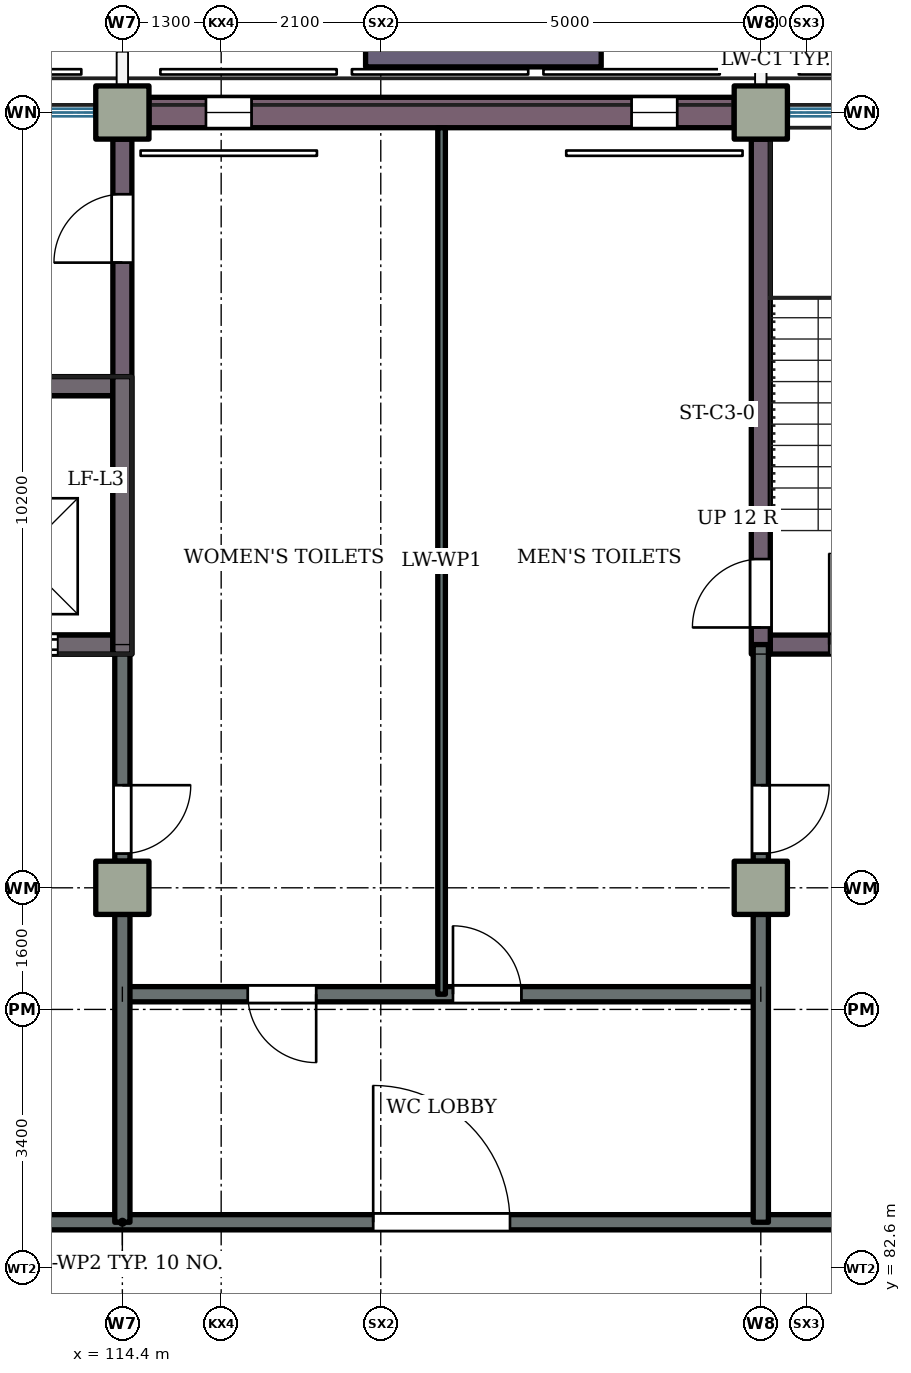
"""IFC4 building model, lengths in metres.
Left out: names, types, materials, properties, quantities, classifications, styles, units other than length and angle.
Written with IfcOpenShell. Run it as: python <this file> out.ifc"""

import sys

from ifc_helpers import new_model, si_unit, direction, frame, frame_2d, origin, origin_2d, place, context, subcontext, project, spatial, rectangle, extrude, element, fill, save


model = new_model("IFC4")
c1 = context("Model", 3, precision=1e-05, world=origin(), true_north=direction((0.0, 1.0)))
c2 = subcontext(c1, "Body", "Model", "MODEL_VIEW")
j1 = project(units=[si_unit("LENGTHUNIT", "METRE"), si_unit("PLANEANGLEUNIT", "RADIAN")], contexts=[c1])
p1 = place(None, origin())
s1 = spatial("IfcSite", under=j1, at=p1, CompositionType="ELEMENT")
p2 = place(p1, origin())
s2 = spatial("IfcBuilding", under=s1, at=p2, CompositionType="ELEMENT")
p3 = place(p2, origin())
s3 = spatial("IfcBuildingStorey", under=s2, at=p3, CompositionType="ELEMENT", Elevation=0.0)
for number, where, z_axis, x_axis in (
    (1, (114.4, 87.6, 0.0), (0.0, 0.0, 1.0), (1.0, 0.0, 0.0)),
    (2, (122.8, 87.6, 0.0), (0.0, 0.0, 1.0), (1.0, 0.0, 0.0)),
    (3, (114.4, 97.8, 0.0), (0.0, 0.0, 1.0), (1.0, 0.0, 0.0)),
    (4, (122.8, 97.8, 0.0), (0.0, 0.0, 1.0), (1.0, 0.0, 0.0)),
):
    element("IfcColumn", number, at=place(p3, frame(where, z_axis=z_axis, x_axis=x_axis)), inside=s3, PredefinedType="COLUMN", context=c2, shape_type="SweptSolid", body=[
        extrude(rectangle(XDim=0.7, YDim=0.7, at=origin_2d()), origin(), (0.0, 0.0, 1.0), 4.2),
    ])
p4 = place(p3, frame((111.825, 90.8, 0.0), z_axis=(0.0, 0.0, 1.0), x_axis=(1.0, 0.0, 0.0)))
e5 = element("IfcWall", 5, at=p4, inside=s3, PredefinedType="SHEAR", context=c2, shape_type="SweptSolid", body=[
    extrude(rectangle(XDim=2.45, YDim=0.25, at=frame_2d((1.225, 0.0))), origin(), (0.0, 0.0, 1.0), 4.2),
])
p5 = place(p4, frame((0.725, 0.0, 0.0)))
e6 = element("IfcOpeningElement", 6, at=p5, cuts=e5, PredefinedType="OPENING", context=c2, shape_type="SweptSolid", body=[
    extrude(rectangle(XDim=1.0, YDim=2.1, at=frame_2d((0.5, 1.05))), frame((0.0, 0.135, 0.0), z_axis=(0.0, -1.0, 0.0), x_axis=(1.0, 0.0, 0.0)), (0.0, 0.0, 1.0), 0.27),
])
p6 = place(p3, frame((122.925, 90.8, 0.0), z_axis=(0.0, 0.0, 1.0), x_axis=(1.0, 0.0, 0.0)))
e7 = element("IfcWall", 7, at=p6, inside=s3, PredefinedType="SHEAR", context=c2, shape_type="SweptSolid", body=[
    extrude(rectangle(XDim=5.45, YDim=0.25, at=frame_2d((2.725, 0.0))), origin(), (0.0, 0.0, 1.0), 4.2),
])
p7 = place(p6, frame((0.775, 0.0, 0.0)))
e8 = element("IfcOpeningElement", 8, at=p7, cuts=e7, PredefinedType="OPENING", context=c2, shape_type="SweptSolid", body=[
    extrude(rectangle(XDim=1.2, YDim=2.1, at=frame_2d((0.6, 1.05))), frame((0.0, 0.135, 0.0), z_axis=(0.0, -1.0, 0.0), x_axis=(1.0, 0.0, 0.0)), (0.0, 0.0, 1.0), 0.27),
])
p8 = place(p3, frame((111.825, 94.2, 0.0), z_axis=(0.0, 0.0, 1.0), x_axis=(1.0, 0.0, 0.0)))
e9 = element("IfcWall", 9, at=p8, inside=s3, PredefinedType="SHEAR", context=c2, shape_type="SweptSolid", body=[
    extrude(rectangle(XDim=2.45, YDim=0.25, at=frame_2d((1.225, 0.0))), origin(), (0.0, 0.0, 1.0), 4.2),
])
p9 = place(p3, frame((114.4, 90.675, 0.0), z_axis=(0.0, 0.0, 1.0), x_axis=(0.0, 1.0, 0.0)))
e10 = element("IfcWall", 10, at=p9, inside=s3, PredefinedType="SHEAR", context=c2, shape_type="SweptSolid", body=[
    extrude(rectangle(XDim=6.775, YDim=0.25, at=frame_2d((3.387, 0.0))), origin(), (0.0, 0.0, 1.0), 4.2),
])
p10 = place(p9, frame((5.15, 0.0, 0.0)))
e11 = element("IfcOpeningElement", 11, at=p10, cuts=e10, PredefinedType="OPENING", context=c2, shape_type="SweptSolid", body=[
    extrude(rectangle(XDim=0.9, YDim=2.1, at=frame_2d((0.45, 1.05))), frame((0.0, 0.135, 0.0), z_axis=(0.0, -1.0, 0.0), x_axis=(1.0, 0.0, 0.0)), (0.0, 0.0, 1.0), 0.27),
])
p11 = place(p3, frame((122.8, 90.675, 0.0), z_axis=(0.0, 0.0, 1.0), x_axis=(0.0, 1.0, 0.0)))
e12 = element("IfcWall", 12, at=p11, inside=s3, PredefinedType="SHEAR", context=c2, shape_type="SweptSolid", body=[
    extrude(rectangle(XDim=6.775, YDim=0.25, at=frame_2d((3.387, 0.0))), origin(), (0.0, 0.0, 1.0), 4.2),
])
p12 = place(p11, frame((0.35, 0.0, 0.0)))
e13 = element("IfcOpeningElement", 13, at=p12, cuts=e12, PredefinedType="OPENING", context=c2, shape_type="SweptSolid", body=[
    extrude(rectangle(XDim=0.9, YDim=2.1, at=frame_2d((0.45, 1.05))), frame((0.0, 0.135, 0.0), z_axis=(0.0, -1.0, 0.0), x_axis=(1.0, 0.0, 0.0)), (0.0, 0.0, 1.0), 0.27),
])
p13 = place(p3, frame((114.75, 97.8, 0.0), z_axis=(0.0, 0.0, 1.0), x_axis=(1.0, 0.0, 0.0)))
e14 = element("IfcWall", 14, at=p13, inside=s3, PredefinedType="SOLIDWALL", context=c2, shape_type="SweptSolid", body=[
    extrude(rectangle(XDim=7.7, YDim=0.4, at=frame_2d((3.85, 0.0))), origin(), (0.0, 0.0, 1.0), 3.32),
])
p14 = place(p13, frame((0.75, 0.0, 2.1)))
e15 = element("IfcOpeningElement", 15, at=p14, cuts=e14, PredefinedType="OPENING", context=c2, shape_type="SweptSolid", body=[
    extrude(rectangle(XDim=0.6, YDim=0.9, at=frame_2d((0.3, 0.45))), frame((0.0, 0.21, 0.0), z_axis=(0.0, -1.0, 0.0), x_axis=(1.0, 0.0, 0.0)), (0.0, 0.0, 1.0), 0.42),
])
p15 = place(p13, frame((6.35, 0.0, 2.1)))
e16 = element("IfcOpeningElement", 16, at=p15, cuts=e14, PredefinedType="OPENING", context=c2, shape_type="SweptSolid", body=[
    extrude(rectangle(XDim=0.6, YDim=0.9, at=frame_2d((0.3, 0.45))), frame((0.0, 0.21, 0.0), z_axis=(0.0, -1.0, 0.0), x_axis=(1.0, 0.0, 0.0)), (0.0, 0.0, 1.0), 0.42),
])
p16 = place(p3, frame((120.7, 98.9, 0.0), z_axis=(0.0, 0.0, 1.0), x_axis=(-1.0, 0.0, 0.0)))
e17 = element("IfcWall", 17, at=p16, inside=s3, PredefinedType="STANDARD", context=c2, shape_type="SweptSolid", body=[
    extrude(rectangle(XDim=3.1, YDim=1.0, at=frame_2d((1.55, 0.0))), origin(), (0.0, 0.0, 1.0), 4.2),
])
p17 = place(p3, frame((97.6, 83.2, 0.0), z_axis=(0.0, 0.0, 1.0), x_axis=(1.0, 0.0, 0.0)))
e18 = element("IfcWall", 18, at=p17, inside=s3, PredefinedType="PARTITIONING", context=c2, shape_type="SweptSolid", body=[
    extrude(rectangle(XDim=33.6, YDim=0.2, at=frame_2d((16.8, 0.0))), origin(), (0.0, 0.0, 1.0), 3.92),
])
p18 = place(p17, frame((3.3, 0.0, 0.0)))
e19 = element("IfcOpeningElement", 19, at=p18, cuts=e18, PredefinedType="OPENING", context=c2, shape_type="SweptSolid", body=[
    extrude(rectangle(XDim=1.8, YDim=2.1, at=frame_2d((0.9, 1.05))), frame((0.0, 0.11, 0.0), z_axis=(0.0, -1.0, 0.0), x_axis=(1.0, 0.0, 0.0)), (0.0, 0.0, 1.0), 0.22),
])
p19 = place(p17, frame((11.7, 0.0, 0.0)))
e20 = element("IfcOpeningElement", 20, at=p19, cuts=e18, PredefinedType="OPENING", context=c2, shape_type="SweptSolid", body=[
    extrude(rectangle(XDim=1.8, YDim=2.1, at=frame_2d((0.9, 1.05))), frame((0.0, 0.11, 0.0), z_axis=(0.0, -1.0, 0.0), x_axis=(1.0, 0.0, 0.0)), (0.0, 0.0, 1.0), 0.22),
])
p20 = place(p17, frame((20.1, 0.0, 0.0)))
e21 = element("IfcOpeningElement", 21, at=p20, cuts=e18, PredefinedType="OPENING", context=c2, shape_type="SweptSolid", body=[
    extrude(rectangle(XDim=1.8, YDim=2.1, at=frame_2d((0.9, 1.05))), frame((0.0, 0.11, 0.0), z_axis=(0.0, -1.0, 0.0), x_axis=(1.0, 0.0, 0.0)), (0.0, 0.0, 1.0), 0.22),
])
p21 = place(p17, frame((28.5, 0.0, 0.0)))
e22 = element("IfcOpeningElement", 22, at=p21, cuts=e18, PredefinedType="OPENING", context=c2, shape_type="SweptSolid", body=[
    extrude(rectangle(XDim=1.8, YDim=2.1, at=frame_2d((0.9, 1.05))), frame((0.0, 0.11, 0.0), z_axis=(0.0, -1.0, 0.0), x_axis=(1.0, 0.0, 0.0)), (0.0, 0.0, 1.0), 0.22),
])
p22 = place(p3, frame((114.4, 86.2, 0.0), z_axis=(0.0, 0.0, 1.0), x_axis=(1.0, 0.0, 0.0)))
e23 = element("IfcWall", 23, at=p22, inside=s3, PredefinedType="PARTITIONING", context=c2, shape_type="SweptSolid", body=[
    extrude(rectangle(XDim=8.4, YDim=0.2, at=frame_2d((4.2, 0.0))), origin(), (0.0, 0.0, 1.0), 3.92),
])
p23 = place(p22, frame((1.65, 0.0, 0.0)))
e24 = element("IfcOpeningElement", 24, at=p23, cuts=e23, PredefinedType="OPENING", context=c2, shape_type="SweptSolid", body=[
    extrude(rectangle(XDim=0.9, YDim=2.1, at=frame_2d((0.45, 1.05))), frame((0.0, 0.11, 0.0), z_axis=(0.0, -1.0, 0.0), x_axis=(1.0, 0.0, 0.0)), (0.0, 0.0, 1.0), 0.22),
])
p24 = place(p22, frame((4.35, 0.0, 0.0)))
e25 = element("IfcOpeningElement", 25, at=p24, cuts=e23, PredefinedType="OPENING", context=c2, shape_type="SweptSolid", body=[
    extrude(rectangle(XDim=0.9, YDim=2.1, at=frame_2d((0.45, 1.05))), frame((0.0, 0.11, 0.0), z_axis=(0.0, -1.0, 0.0), x_axis=(1.0, 0.0, 0.0)), (0.0, 0.0, 1.0), 0.22),
])
p25 = place(p3, frame((114.4, 83.2, 0.0), z_axis=(0.0, 0.0, 1.0), x_axis=(0.0, 1.0, 0.0)))
e26 = element("IfcWall", 26, at=p25, inside=s3, PredefinedType="PARTITIONING", context=c2, shape_type="SweptSolid", body=[
    extrude(rectangle(XDim=4.05, YDim=0.2, at=frame_2d((2.025, 0.0))), origin(), (0.0, 0.0, 1.0), 3.02),
])
p26 = place(p3, frame((114.4, 87.95, 0.0), z_axis=(0.0, 0.0, 1.0), x_axis=(0.0, 1.0, 0.0)))
e27 = element("IfcWall", 27, at=p26, inside=s3, PredefinedType="PARTITIONING", context=c2, shape_type="SweptSolid", body=[
    extrude(rectangle(XDim=2.85, YDim=0.2, at=frame_2d((1.425, 0.0))), origin(), (0.0, 0.0, 1.0), 3.02),
])
p27 = place(p26, frame((0.1, 0.0, 0.0)))
e28 = element("IfcOpeningElement", 28, at=p27, cuts=e27, PredefinedType="OPENING", context=c2, shape_type="SweptSolid", body=[
    extrude(rectangle(XDim=0.9, YDim=2.1, at=frame_2d((0.45, 1.05))), frame((0.0, 0.11, 0.0), z_axis=(0.0, -1.0, 0.0), x_axis=(1.0, 0.0, 0.0)), (0.0, 0.0, 1.0), 0.22),
])
p28 = place(p3, frame((118.6, 86.2, 0.0), z_axis=(0.0, 0.0, 1.0), x_axis=(0.0, 1.0, 0.0)))
e29 = element("IfcWall", 29, at=p28, inside=s3, PredefinedType="PARTITIONING", context=c2, shape_type="SweptSolid", body=[
    extrude(rectangle(XDim=11.4, YDim=0.1, at=frame_2d((5.7, 0.0))), origin(), (0.0, 0.0, 1.0), 3.92),
])
p29 = place(p3, frame((122.8, 83.2, 0.0), z_axis=(0.0, 0.0, 1.0), x_axis=(0.0, 1.0, 0.0)))
e30 = element("IfcWall", 30, at=p29, inside=s3, PredefinedType="PARTITIONING", context=c2, shape_type="SweptSolid", body=[
    extrude(rectangle(XDim=4.05, YDim=0.2, at=frame_2d((2.025, 0.0))), origin(), (0.0, 0.0, 1.0), 3.02),
])
p30 = place(p3, frame((122.8, 87.95, 0.0), z_axis=(0.0, 0.0, 1.0), x_axis=(0.0, 1.0, 0.0)))
e31 = element("IfcWall", 31, at=p30, inside=s3, PredefinedType="PARTITIONING", context=c2, shape_type="SweptSolid", body=[
    extrude(rectangle(XDim=2.85, YDim=0.2, at=frame_2d((1.425, 0.0))), origin(), (0.0, 0.0, 1.0), 3.02),
])
p31 = place(p30, frame((0.1, 0.0, 0.0)))
e32 = element("IfcOpeningElement", 32, at=p31, cuts=e31, PredefinedType="OPENING", context=c2, shape_type="SweptSolid", body=[
    extrude(rectangle(XDim=0.9, YDim=2.1, at=frame_2d((0.45, 1.05))), frame((0.0, 0.11, 0.0), z_axis=(0.0, -1.0, 0.0), x_axis=(1.0, 0.0, 0.0)), (0.0, 0.0, 1.0), 0.22),
])
for number, where, z_axis, x_axis in (
    (33, (109.125, 90.8, -1.2), (0.0, 0.0, 1.0), (1.0, 0.0, 0.0)),
    (34, (109.125, 94.2, -1.2), (0.0, 0.0, 1.0), (1.0, 0.0, 0.0)),
):
    element("IfcWall", number, at=place(p3, frame(where, z_axis=z_axis, x_axis=x_axis)), inside=s3, PredefinedType="SOLIDWALL", context=c2, shape_type="SweptSolid", body=[
        extrude(rectangle(XDim=5.15, YDim=0.25, at=frame_2d((2.575, 0.0))), origin(), (0.0, 0.0, 1.0), 1.2),
    ])
p32 = place(p3, frame((114.4, 90.675, -1.2), z_axis=(0.0, 0.0, 1.0), x_axis=(0.0, 1.0, 0.0)))
e35 = element("IfcWall", 35, at=p32, inside=s3, PredefinedType="SOLIDWALL", context=c2, shape_type="SweptSolid", body=[
    extrude(rectangle(XDim=3.65, YDim=0.25, at=frame_2d((1.825, 0.0))), origin(), (0.0, 0.0, 1.0), 1.2),
])
p33 = place(p14, origin())
e36 = element("IfcWindow", 36, at=p33, inside=s3, PartitioningType="SINGLE_PANEL", PredefinedType="WINDOW", context=c2, shape_type="SweptSolid", body=[
    extrude(rectangle(XDim=0.6, YDim=0.9, at=frame_2d((0.3, 0.45))), frame((0.0, 0.03, 0.0), z_axis=(0.0, -1.0, 0.0), x_axis=(1.0, 0.0, 0.0)), (0.0, 0.0, 1.0), 0.06),
])
fill(e15, e36)
p34 = place(p15, origin())
e37 = element("IfcWindow", 37, at=p34, inside=s3, PartitioningType="SINGLE_PANEL", PredefinedType="WINDOW", context=c2, shape_type="SweptSolid", body=[
    extrude(rectangle(XDim=0.6, YDim=0.9, at=frame_2d((0.3, 0.45))), frame((0.0, 0.03, 0.0), z_axis=(0.0, -1.0, 0.0), x_axis=(1.0, 0.0, 0.0)), (0.0, 0.0, 1.0), 0.06),
])
fill(e16, e37)
p35 = place(p27, origin())
e38 = element("IfcDoor", 38, at=p35, inside=s3, OperationType="SINGLE_SWING_RIGHT", PredefinedType="DOOR", context=c2, shape_type="SweptSolid", body=[
    extrude(rectangle(XDim=0.9, YDim=2.1, at=frame_2d((0.45, 1.05))), frame((0.0, 0.025, 0.0), z_axis=(0.0, -1.0, 0.0), x_axis=(1.0, 0.0, 0.0)), (0.0, 0.0, 1.0), 0.05),
])
fill(e28, e38)
p36 = place(p10, origin())
e39 = element("IfcDoor", 39, at=p36, inside=s3, OperationType="SINGLE_SWING_LEFT", PredefinedType="DOOR", context=c2, shape_type="SweptSolid", body=[
    extrude(rectangle(XDim=0.9, YDim=2.1, at=frame_2d((0.45, 1.05))), frame((0.0, 0.025, 0.0), z_axis=(0.0, -1.0, 0.0), x_axis=(1.0, 0.0, 0.0)), (0.0, 0.0, 1.0), 0.05),
])
fill(e11, e39)
p37 = place(p23, origin())
e40 = element("IfcDoor", 40, at=p37, inside=s3, OperationType="SINGLE_SWING_RIGHT", PredefinedType="DOOR", context=c2, shape_type="SweptSolid", body=[
    extrude(rectangle(XDim=0.9, YDim=2.1, at=frame_2d((0.45, 1.05))), frame((0.0, 0.025, 0.0), z_axis=(0.0, -1.0, 0.0), x_axis=(1.0, 0.0, 0.0)), (0.0, 0.0, 1.0), 0.05),
])
fill(e24, e40)
p38 = place(p24, origin())
e41 = element("IfcDoor", 41, at=p38, inside=s3, OperationType="SINGLE_SWING_LEFT", PredefinedType="DOOR", context=c2, shape_type="SweptSolid", body=[
    extrude(rectangle(XDim=0.9, YDim=2.1, at=frame_2d((0.45, 1.05))), frame((0.0, 0.025, 0.0), z_axis=(0.0, -1.0, 0.0), x_axis=(1.0, 0.0, 0.0)), (0.0, 0.0, 1.0), 0.05),
])
fill(e25, e41)
p39 = place(p31, origin())
e42 = element("IfcDoor", 42, at=p39, inside=s3, OperationType="SINGLE_SWING_RIGHT", PredefinedType="DOOR", context=c2, shape_type="SweptSolid", body=[
    extrude(rectangle(XDim=0.9, YDim=2.1, at=frame_2d((0.45, 1.05))), frame((0.0, 0.025, 0.0), z_axis=(0.0, -1.0, 0.0), x_axis=(1.0, 0.0, 0.0)), (0.0, 0.0, 1.0), 0.05),
])
fill(e32, e42)
p40 = place(p12, origin())
e43 = element("IfcDoor", 43, at=p40, inside=s3, OperationType="SINGLE_SWING_LEFT", PredefinedType="DOOR", context=c2, shape_type="SweptSolid", body=[
    extrude(rectangle(XDim=0.9, YDim=2.1, at=frame_2d((0.45, 1.05))), frame((0.0, 0.025, 0.0), z_axis=(0.0, -1.0, 0.0), x_axis=(1.0, 0.0, 0.0)), (0.0, 0.0, 1.0), 0.05),
])
fill(e13, e43)
p41 = place(p20, origin())
e44 = element("IfcDoor", 44, at=p41, inside=s3, OperationType="DOUBLE_DOOR_SINGLE_SWING", PredefinedType="DOOR", context=c2, shape_type="SweptSolid", body=[
    extrude(rectangle(XDim=1.8, YDim=2.1, at=frame_2d((0.9, 1.05))), frame((0.0, 0.025, 0.0), z_axis=(0.0, -1.0, 0.0), x_axis=(1.0, 0.0, 0.0)), (0.0, 0.0, 1.0), 0.05),
])
fill(e21, e44)
p42 = place(p5, origin())
e45 = element("IfcDoor", 45, at=p42, inside=s3, OperationType="SLIDING_TO_LEFT", PredefinedType="DOOR", context=c2, shape_type="SweptSolid", body=[
    extrude(rectangle(XDim=1.0, YDim=2.1, at=frame_2d((0.5, 1.05))), frame((0.0, 0.025, 0.0), z_axis=(0.0, -1.0, 0.0), x_axis=(1.0, 0.0, 0.0)), (0.0, 0.0, 1.0), 0.05),
])
fill(e6, e45)
p43 = place(p7, origin())
e46 = element("IfcDoor", 46, at=p43, inside=s3, OperationType="SINGLE_SWING_LEFT", PredefinedType="DOOR", context=c2, shape_type="SweptSolid", body=[
    extrude(rectangle(XDim=1.2, YDim=2.1, at=frame_2d((0.6, 1.05))), frame((0.0, 0.025, 0.0), z_axis=(0.0, -1.0, 0.0), x_axis=(1.0, 0.0, 0.0)), (0.0, 0.0, 1.0), 0.05),
])
fill(e8, e46)
save(model, sys.argv[1])
